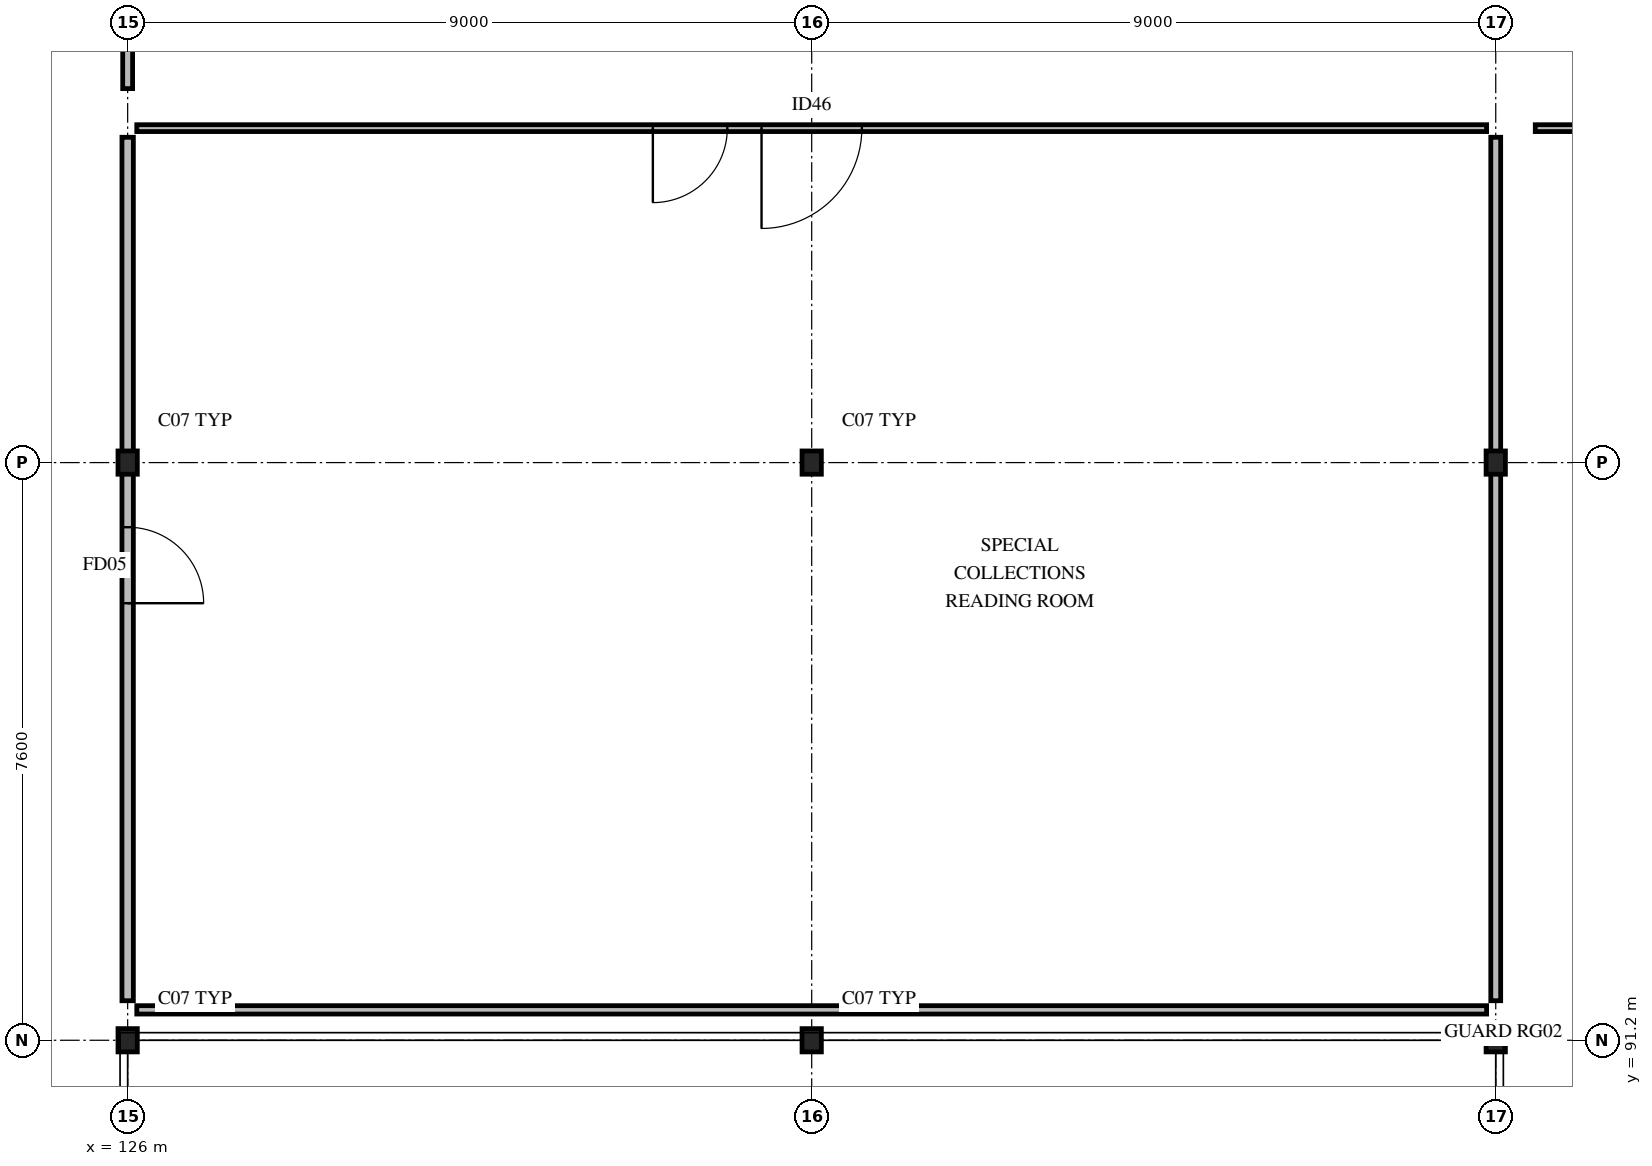
"""IFC4 building model, lengths in metres.
Left out: names, types, materials, properties, quantities, classifications, styles, units other than length and angle.
Written with IfcOpenShell. Run it as: python <this file> out.ifc"""

import sys

from ifc_helpers import new_model, si_unit, direction, frame, frame_2d, origin, origin_2d, place, context, subcontext, project, spatial, rectangle, i_section, extrude, element, fill, save


model = new_model("IFC4")
c1 = context("Model", 3, precision=1e-05, world=origin(), true_north=direction((0.0, 1.0)))
c2 = subcontext(c1, "Body", "Model", "MODEL_VIEW")
j1 = project(units=[si_unit("LENGTHUNIT", "METRE"), si_unit("PLANEANGLEUNIT", "RADIAN")], contexts=[c1])
p1 = place(None, origin())
s1 = spatial("IfcSite", under=j1, at=p1, CompositionType="ELEMENT")
p2 = place(p1, origin())
s2 = spatial("IfcBuilding", under=s1, at=p2, CompositionType="ELEMENT")
p3 = place(p2, frame((0.0, 0.0, 13.68)))
s3 = spatial("IfcBuildingStorey", under=s2, at=p3, CompositionType="ELEMENT", Elevation=13.68)
for number, where, z_axis, x_axis in (
    (1, (126.0, 91.2, 0.0), (0.0, 0.0, 1.0), (1.0, 0.0, 0.0)),
    (2, (126.0, 98.8, 0.0), (0.0, 0.0, 1.0), (1.0, 0.0, 0.0)),
    (3, (135.0, 91.2, 0.0), (0.0, 0.0, 1.0), (1.0, 0.0, 0.0)),
    (4, (135.0, 98.8, 0.0), (0.0, 0.0, 1.0), (1.0, 0.0, 0.0)),
    (5, (144.0, 91.2, 0.0), (0.0, 0.0, 1.0), (1.0, 0.0, 0.0)),
    (6, (144.0, 98.8, 0.0), (0.0, 0.0, 1.0), (1.0, 0.0, 0.0)),
):
    element("IfcColumn", number, at=place(p3, frame(where, z_axis=z_axis, x_axis=x_axis)), inside=s3, PredefinedType="COLUMN", context=c2, shape_type="SweptSolid", body=[
        extrude(i_section(OverallWidth=0.254, OverallDepth=0.306, WebThickness=0.009, FlangeThickness=0.015, FilletRadius=0.015, at=origin_2d()), origin(), (0.0, 0.0, 1.0), 4.32),
    ])
p4 = place(p3, frame((126.12, 103.2, 0.0), z_axis=(0.0, 0.0, 1.0), x_axis=(1.0, 0.0, 0.0)))
e7 = element("IfcWall", 7, at=p4, inside=s3, PredefinedType="PARTITIONING", context=c2, shape_type="SweptSolid", body=[
    extrude(rectangle(XDim=17.76, YDim=0.09, at=frame_2d((8.88, 0.0))), origin(), (0.0, 0.0, 1.0), 4.04),
])
p5 = place(p4, frame((8.22, 0.0, 0.0)))
e8 = element("IfcOpeningElement", 8, at=p5, cuts=e7, PredefinedType="OPENING", context=c2, shape_type="SweptSolid", body=[
    extrude(rectangle(XDim=1.32, YDim=2.2, at=frame_2d((0.66, 1.1))), frame((0.0, 0.055, 0.0), z_axis=(0.0, -1.0, 0.0), x_axis=(1.0, 0.0, 0.0)), (0.0, 0.0, 1.0), 0.11),
])
p6 = place(p4, frame((6.79, 0.0, 0.0)))
e9 = element("IfcOpeningElement", 9, at=p6, cuts=e7, PredefinedType="OPENING", context=c2, shape_type="SweptSolid", body=[
    extrude(rectangle(XDim=0.98, YDim=2.06, at=frame_2d((0.49, 1.03))), frame((0.0, 0.055, 0.0), z_axis=(0.0, -1.0, 0.0), x_axis=(1.0, 0.0, 0.0)), (0.0, 0.0, 1.0), 0.11),
])
p7 = place(p3, frame((126.0, 91.72, 0.0), z_axis=(0.0, 0.0, 1.0), x_axis=(0.0, 1.0, 0.0)))
e10 = element("IfcWall", 10, at=p7, inside=s3, PredefinedType="PARTITIONING", context=c2, shape_type="SweptSolid", body=[
    extrude(rectangle(XDim=11.36, YDim=0.15, at=frame_2d((5.68, 0.0))), origin(), (0.0, 0.0, 1.0), 3.631),
])
p8 = place(p7, frame((5.23, 0.0, 0.0)))
e11 = element("IfcOpeningElement", 11, at=p8, cuts=e10, PredefinedType="OPENING", context=c2, shape_type="SweptSolid", body=[
    extrude(rectangle(XDim=1.0, YDim=2.15, at=frame_2d((0.5, 1.075))), frame((0.0, 0.085, 0.0), z_axis=(0.0, -1.0, 0.0), x_axis=(1.0, 0.0, 0.0)), (0.0, 0.0, 1.0), 0.17),
])
p9 = place(p3, frame((144.0, 91.72, 0.0), z_axis=(0.0, 0.0, 1.0), x_axis=(0.0, 1.0, 0.0)))
e12 = element("IfcWall", 12, at=p9, inside=s3, PredefinedType="PARTITIONING", context=c2, shape_type="SweptSolid", body=[
    extrude(rectangle(XDim=11.36, YDim=0.13, at=frame_2d((5.68, 0.0))), origin(), (0.0, 0.0, 1.0), 3.788),
])
p10 = place(p3, frame((126.12, 91.6, 0.0), z_axis=(0.0, 0.0, 1.0), x_axis=(1.0, 0.0, 0.0)))
e13 = element("IfcWall", 13, at=p10, inside=s3, PredefinedType="PARTITIONING", context=c2, shape_type="SweptSolid", body=[
    extrude(rectangle(XDim=17.76, YDim=0.11, at=frame_2d((8.88, 0.0))), origin(), (0.0, 0.0, 1.0), 4.04),
])
p11 = place(p3, frame((144.52, 103.2, 0.0), z_axis=(0.0, 0.0, 1.0), x_axis=(1.0, 0.0, 0.0)))
e14 = element("IfcWall", 14, at=p11, inside=s3, PredefinedType="PARTITIONING", context=c2, shape_type="SweptSolid", body=[
    extrude(rectangle(XDim=2.56, YDim=0.09, at=frame_2d((1.28, 0.0))), origin(), (0.0, 0.0, 1.0), 4.04),
])
p12 = place(p11, frame((0.81, 0.0, 0.0)))
e15 = element("IfcOpeningElement", 15, at=p12, cuts=e14, PredefinedType="OPENING", context=c2, shape_type="SweptSolid", body=[
    extrude(rectangle(XDim=0.94, YDim=2.06, at=frame_2d((0.47, 1.03))), frame((0.0, 0.055, 0.0), z_axis=(0.0, -1.0, 0.0), x_axis=(1.0, 0.0, 0.0)), (0.0, 0.0, 1.0), 0.11),
])
p13 = place(p3, frame((126.0, 103.72, 0.0), z_axis=(0.0, 0.0, 1.0), x_axis=(0.0, 1.0, 0.0)))
e16 = element("IfcWall", 16, at=p13, inside=s3, PredefinedType="PARTITIONING", context=c2, shape_type="SweptSolid", body=[
    extrude(rectangle(XDim=2.56, YDim=0.13, at=frame_2d((1.28, 0.0))), origin(), (0.0, 0.0, 1.0), 3.631),
])
p14 = place(p5, origin())
e17 = element("IfcDoor", 17, at=p14, inside=s3, OperationType="SINGLE_SWING_RIGHT", PredefinedType="DOOR", context=c2, shape_type="SweptSolid", body=[
    extrude(rectangle(XDim=1.32, YDim=2.2, at=frame_2d((0.66, 1.1))), frame((0.0, 0.025, 0.0), z_axis=(0.0, -1.0, 0.0), x_axis=(1.0, 0.0, 0.0)), (0.0, 0.0, 1.0), 0.05),
])
fill(e8, e17)
p15 = place(p8, origin())
e18 = element("IfcDoor", 18, at=p15, inside=s3, OperationType="SINGLE_SWING_RIGHT", PredefinedType="DOOR", context=c2, shape_type="SweptSolid", body=[
    extrude(rectangle(XDim=1.0, YDim=2.15, at=frame_2d((0.5, 1.075))), frame((0.0, 0.025, 0.0), z_axis=(0.0, -1.0, 0.0), x_axis=(1.0, 0.0, 0.0)), (0.0, 0.0, 1.0), 0.05),
])
fill(e11, e18)
p16 = place(p6, origin())
e19 = element("IfcDoor", 19, at=p16, inside=s3, OperationType="SINGLE_SWING_RIGHT", PredefinedType="DOOR", context=c2, shape_type="SweptSolid", body=[
    extrude(rectangle(XDim=0.98, YDim=2.06, at=frame_2d((0.49, 1.03))), frame((0.0, 0.025, 0.0), z_axis=(0.0, -1.0, 0.0), x_axis=(1.0, 0.0, 0.0)), (0.0, 0.0, 1.0), 0.05),
])
fill(e9, e19)
save(model, sys.argv[1])
